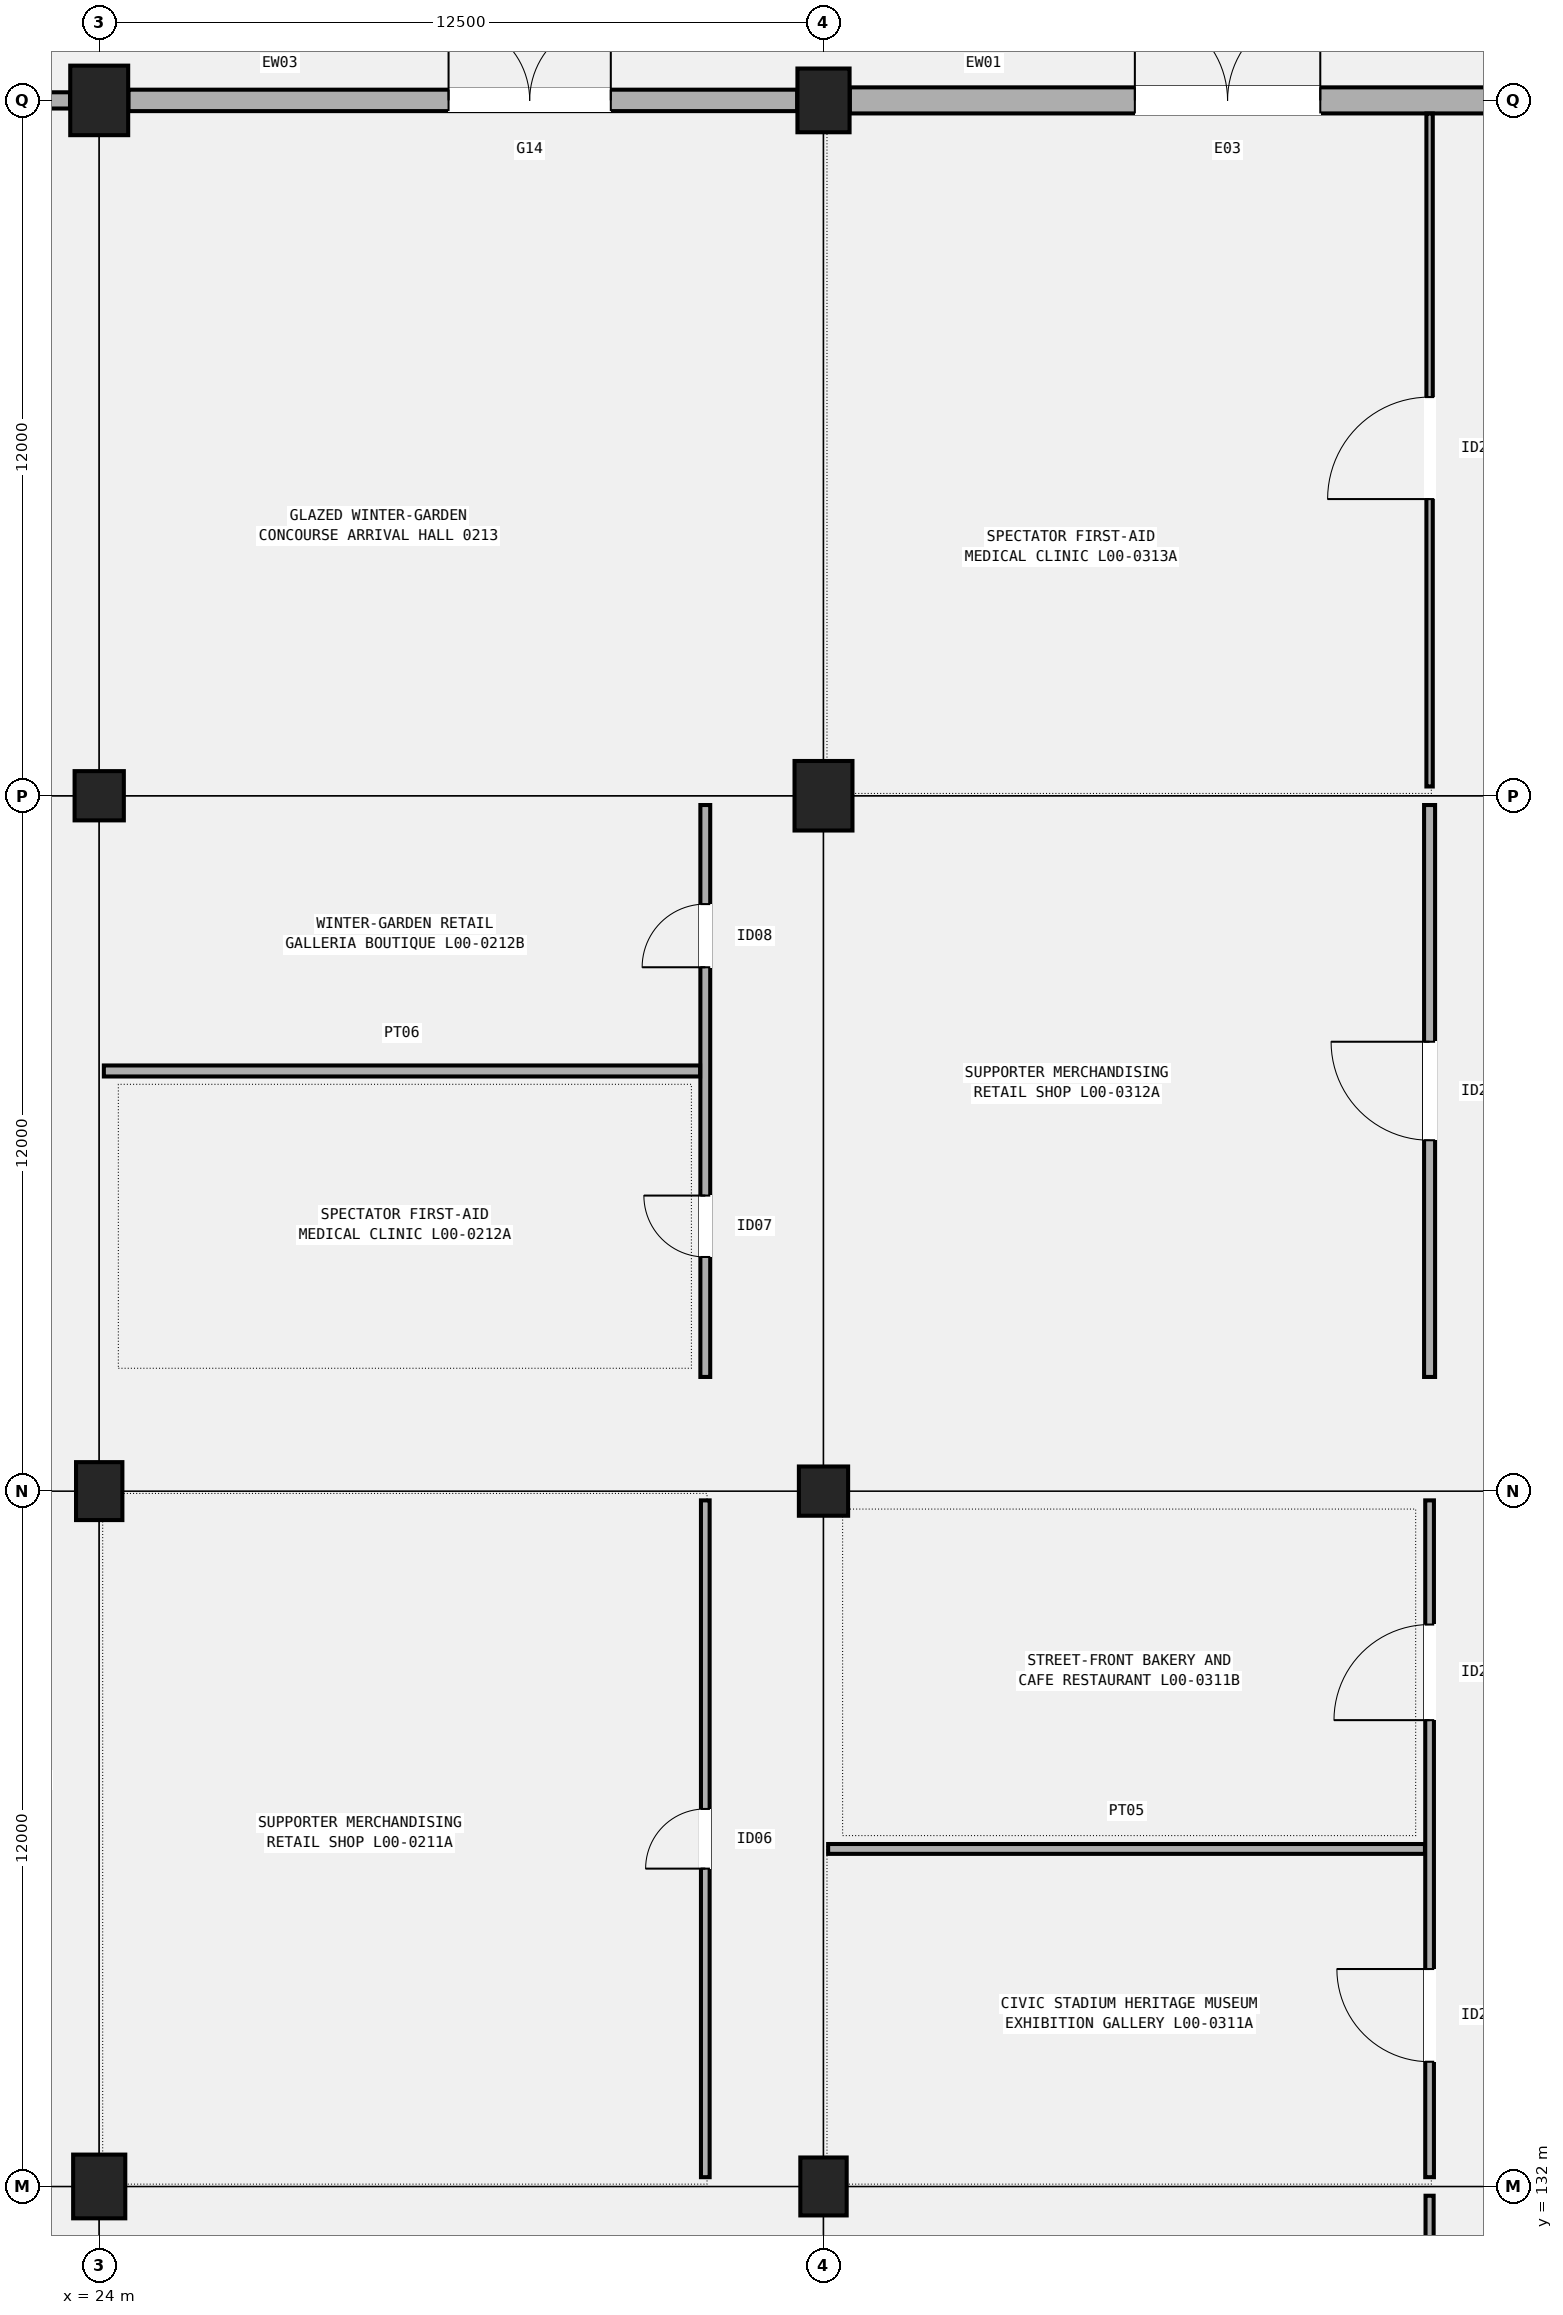
"""IFC4 building model, lengths in metres.
Left out: names, types, materials, properties, quantities, classifications, styles, units other than length and angle.
Written with IfcOpenShell. Run it as: python <this file> out.ifc"""

import sys

from ifc_helpers import new_model, si_unit, direction, frame, frame_2d, origin, origin_2d, place, context, subcontext, project, spatial, rectangle, circle, extrude, element, fill, save


model = new_model("IFC4")
c1 = context("Model", 3, precision=1e-05, world=origin(), true_north=direction((0.0, 1.0)))
c2 = subcontext(c1, "Body", "Model", "MODEL_VIEW")
j1 = project(units=[si_unit("LENGTHUNIT", "METRE"), si_unit("PLANEANGLEUNIT", "RADIAN")], contexts=[c1])
p1 = place(None, origin())
s1 = spatial("IfcSite", under=j1, at=p1, CompositionType="ELEMENT")
p2 = place(p1, origin())
s2 = spatial("IfcBuilding", under=s1, at=p2, CompositionType="ELEMENT")
p3 = place(p2, origin())
s3 = spatial("IfcBuildingStorey", under=s2, at=p3, CompositionType="ELEMENT", Elevation=0.0)
p4 = place(p3, frame((24.0, 132.0, 0.0), z_axis=(0.0, 0.0, 1.0), x_axis=(1.0, 0.0, 0.0)))
e1 = element("IfcColumn", 1, at=p4, inside=s3, PredefinedType="COLUMN", context=c2, shape_type="SweptSolid", body=[
    extrude(rectangle(XDim=0.9, YDim=1.1, at=origin_2d()), origin(), (0.0, 0.0, 1.0), 5.4),
])
p5 = place(p3, frame((24.0, 144.0, 0.0), z_axis=(0.0, 0.0, 1.0), x_axis=(1.0, 0.0, 0.0)))
e2 = element("IfcColumn", 2, at=p5, inside=s3, PredefinedType="COLUMN", context=c2, shape_type="SweptSolid", body=[
    extrude(rectangle(XDim=0.8, YDim=1.0, at=origin_2d()), origin(), (0.0, 0.0, 1.0), 5.4),
])
p6 = place(p3, frame((24.0, 156.0, 0.0), z_axis=(0.0, 0.0, 1.0), x_axis=(1.0, 0.0, 0.0)))
e3 = element("IfcColumn", 3, at=p6, inside=s3, PredefinedType="COLUMN", context=c2, shape_type="SweptSolid", body=[
    extrude(circle(Radius=0.425, at=origin_2d()), origin(), (0.0, 0.0, 1.0), 5.4),
])
p7 = place(p3, frame((24.0, 168.0, 0.0), z_axis=(0.0, 0.0, 1.0), x_axis=(1.0, 0.0, 0.0)))
e4 = element("IfcColumn", 4, at=p7, inside=s3, PredefinedType="COLUMN", context=c2, shape_type="SweptSolid", body=[
    extrude(rectangle(XDim=1.0, YDim=1.2, at=origin_2d()), origin(), (0.0, 0.0, 1.0), 5.4),
])
p8 = place(p3, frame((36.5, 132.0, 0.0), z_axis=(0.0, 0.0, 1.0), x_axis=(1.0, 0.0, 0.0)))
e5 = element("IfcColumn", 5, at=p8, inside=s3, PredefinedType="COLUMN", context=c2, shape_type="SweptSolid", body=[
    extrude(rectangle(XDim=0.8, YDim=1.0, at=origin_2d()), origin(), (0.0, 0.0, 1.0), 5.4),
])
p9 = place(p3, frame((36.5, 144.0, 0.0), z_axis=(0.0, 0.0, 1.0), x_axis=(1.0, 0.0, 0.0)))
e6 = element("IfcColumn", 6, at=p9, inside=s3, PredefinedType="COLUMN", context=c2, shape_type="SweptSolid", body=[
    extrude(circle(Radius=0.425, at=origin_2d()), origin(), (0.0, 0.0, 1.0), 5.4),
])
p10 = place(p3, frame((36.5, 156.0, 0.0), z_axis=(0.0, 0.0, 1.0), x_axis=(1.0, 0.0, 0.0)))
e7 = element("IfcColumn", 7, at=p10, inside=s3, PredefinedType="COLUMN", context=c2, shape_type="SweptSolid", body=[
    extrude(rectangle(XDim=1.0, YDim=1.2, at=origin_2d()), origin(), (0.0, 0.0, 1.0), 5.4),
])
p11 = place(p3, frame((36.5, 168.0, 0.0), z_axis=(0.0, 0.0, 1.0), x_axis=(1.0, 0.0, 0.0)))
e8 = element("IfcColumn", 8, at=p11, inside=s3, PredefinedType="COLUMN", context=c2, shape_type="SweptSolid", body=[
    extrude(rectangle(XDim=0.9, YDim=1.1, at=origin_2d()), origin(), (0.0, 0.0, 1.0), 5.4),
])
p12 = place(p3, frame((12.429, 168.0, 0.0), z_axis=(0.0, 0.0, 1.0), x_axis=(1.0, 0.0, 0.0)))
e9 = element("IfcWall", 9, at=p12, inside=s3, PredefinedType="SOLIDWALL", context=c2, shape_type="SweptSolid", body=[
    extrude(rectangle(XDim=11.067, YDim=0.28, at=frame_2d((5.534, 0.0))), origin(), (0.0, 0.0, 1.0), 4.34),
])
p13 = place(p12, frame((5.24, 0.0, 0.0)))
e10 = element("IfcOpeningElement", 10, at=p13, cuts=e9, PredefinedType="OPENING", context=c2, shape_type="SweptSolid", body=[
    extrude(rectangle(XDim=2.8, YDim=2.4, at=frame_2d((1.4, 1.2))), frame((0.0, 0.15, 0.0), z_axis=(0.0, -1.0, 0.0), x_axis=(1.0, 0.0, 0.0)), (0.0, 0.0, 1.0), 0.3),
])
p14 = place(p3, frame((24.504, 168.0, 0.0), z_axis=(0.0, 0.0, 1.0), x_axis=(1.0, 0.0, 0.0)))
e11 = element("IfcWall", 11, at=p14, inside=s3, PredefinedType="SOLIDWALL", context=c2, shape_type="SweptSolid", body=[
    extrude(rectangle(XDim=11.542, YDim=0.37, at=frame_2d((5.771, 0.0))), origin(), (0.0, 0.0, 1.0), 4.09),
])
p15 = place(p14, frame((5.525, 0.0, 0.0)))
e12 = element("IfcOpeningElement", 12, at=p15, cuts=e11, PredefinedType="OPENING", context=c2, shape_type="SweptSolid", body=[
    extrude(rectangle(XDim=2.8, YDim=2.4, at=frame_2d((1.4, 1.2))), frame((0.0, 0.195, 0.0), z_axis=(0.0, -1.0, 0.0), x_axis=(1.0, 0.0, 0.0)), (0.0, 0.0, 1.0), 0.39),
])
p16 = place(p3, frame((36.954, 168.0, 0.0), z_axis=(0.0, 0.0, 1.0), x_axis=(1.0, 0.0, 0.0)))
e13 = element("IfcWall", 13, at=p16, inside=s3, PredefinedType="SOLIDWALL", context=c2, shape_type="SweptSolid", body=[
    extrude(rectangle(XDim=11.642, YDim=0.45, at=frame_2d((5.821, 0.0))), origin(), (0.0, 0.0, 1.0), 4.24),
])
p17 = place(p16, frame((4.919, 0.0, 0.0)))
e14 = element("IfcOpeningElement", 14, at=p17, cuts=e13, PredefinedType="OPENING", context=c2, shape_type="SweptSolid", body=[
    extrude(rectangle(XDim=3.2, YDim=2.6, at=frame_2d((1.6, 1.3))), frame((0.0, 0.235, 0.0), z_axis=(0.0, -1.0, 0.0), x_axis=(1.0, 0.0, 0.0)), (0.0, 0.0, 1.0), 0.47),
])
p18 = place(p3, frame((34.46, 132.16, 0.0), z_axis=(0.0, 0.0, 1.0), x_axis=(0.0, 1.0, 0.0)))
e15 = element("IfcWall", 15, at=p18, inside=s3, PredefinedType="PARTITIONING", context=c2, shape_type="SweptSolid", body=[
    extrude(rectangle(XDim=11.68, YDim=0.15, at=frame_2d((5.84, 0.0))), origin(), (0.0, 0.0, 1.0), 4.52),
])
p19 = place(p18, frame((5.325, 0.0, 0.0)))
e16 = element("IfcOpeningElement", 16, at=p19, cuts=e15, PredefinedType="OPENING", context=c2, shape_type="SweptSolid", body=[
    extrude(rectangle(XDim=1.03, YDim=2.12, at=frame_2d((0.515, 1.06))), frame((0.0, 0.085, 0.0), z_axis=(0.0, -1.0, 0.0), x_axis=(1.0, 0.0, 0.0)), (0.0, 0.0, 1.0), 0.17),
])
p20 = place(p3, frame((34.46, 145.97, 0.0), z_axis=(0.0, 0.0, 1.0), x_axis=(0.0, 1.0, 0.0)))
e17 = element("IfcWall", 17, at=p20, inside=s3, PredefinedType="PARTITIONING", context=c2, shape_type="SweptSolid", body=[
    extrude(rectangle(XDim=9.87, YDim=0.17, at=frame_2d((4.935, 0.0))), origin(), (0.0, 0.0, 1.0), 4.52),
])
p21 = place(p20, frame((2.07, 0.0, 0.0)))
e18 = element("IfcOpeningElement", 18, at=p21, cuts=e17, PredefinedType="OPENING", context=c2, shape_type="SweptSolid", body=[
    extrude(rectangle(XDim=1.06, YDim=2.15, at=frame_2d((0.53, 1.075))), frame((0.0, 0.095, 0.0), z_axis=(0.0, -1.0, 0.0), x_axis=(1.0, 0.0, 0.0)), (0.0, 0.0, 1.0), 0.19),
])
p22 = place(p20, frame((7.07, 0.0, 0.0)))
e19 = element("IfcOpeningElement", 19, at=p22, cuts=e17, PredefinedType="OPENING", context=c2, shape_type="SweptSolid", body=[
    extrude(rectangle(XDim=1.09, YDim=2.16, at=frame_2d((0.545, 1.08))), frame((0.0, 0.095, 0.0), z_axis=(0.0, -1.0, 0.0), x_axis=(1.0, 0.0, 0.0)), (0.0, 0.0, 1.0), 0.19),
])
p23 = place(p3, frame((24.08, 151.25, 0.0), z_axis=(0.0, 0.0, 1.0), x_axis=(1.0, 0.0, 0.0)))
e20 = element("IfcWall", 20, at=p23, inside=s3, PredefinedType="PARTITIONING", context=c2, shape_type="SweptSolid", body=[
    extrude(rectangle(XDim=10.29, YDim=0.19, at=frame_2d((5.145, 0.0))), origin(), (0.0, 0.0, 1.0), 4.52),
])
p24 = place(p3, frame((46.96, 120.16, 0.0), z_axis=(0.0, 0.0, 1.0), x_axis=(0.0, 1.0, 0.0)))
e21 = element("IfcWall", 21, at=p24, inside=s3, PredefinedType="PARTITIONING", context=c2, shape_type="SweptSolid", body=[
    extrude(rectangle(XDim=11.68, YDim=0.14, at=frame_2d((5.84, 0.0))), origin(), (0.0, 0.0, 1.0), 4.52),
])
p25 = place(p24, frame((5.06, 0.0, 0.0)))
e22 = element("IfcOpeningElement", 22, at=p25, cuts=e21, PredefinedType="OPENING", context=c2, shape_type="SweptSolid", body=[
    extrude(rectangle(XDim=1.56, YDim=2.26, at=frame_2d((0.78, 1.13))), frame((0.0, 0.08, 0.0), z_axis=(0.0, -1.0, 0.0), x_axis=(1.0, 0.0, 0.0)), (0.0, 0.0, 1.0), 0.16),
])
p26 = place(p3, frame((46.96, 132.16, 0.0), z_axis=(0.0, 0.0, 1.0), x_axis=(0.0, 1.0, 0.0)))
e23 = element("IfcWall", 23, at=p26, inside=s3, PredefinedType="PARTITIONING", context=c2, shape_type="SweptSolid", body=[
    extrude(rectangle(XDim=11.68, YDim=0.15, at=frame_2d((5.84, 0.0))), origin(), (0.0, 0.0, 1.0), 4.52),
])
p27 = place(p26, frame((1.992, 0.0, 0.0)))
e24 = element("IfcOpeningElement", 24, at=p27, cuts=e23, PredefinedType="OPENING", context=c2, shape_type="SweptSolid", body=[
    extrude(rectangle(XDim=1.6, YDim=2.3, at=frame_2d((0.8, 1.15))), frame((0.0, 0.085, 0.0), z_axis=(0.0, -1.0, 0.0), x_axis=(1.0, 0.0, 0.0)), (0.0, 0.0, 1.0), 0.17),
])
p28 = place(p26, frame((7.887, 0.0, 0.0)))
e25 = element("IfcOpeningElement", 25, at=p28, cuts=e23, PredefinedType="OPENING", context=c2, shape_type="SweptSolid", body=[
    extrude(rectangle(XDim=1.65, YDim=2.28, at=frame_2d((0.825, 1.14))), frame((0.0, 0.085, 0.0), z_axis=(0.0, -1.0, 0.0), x_axis=(1.0, 0.0, 0.0)), (0.0, 0.0, 1.0), 0.17),
])
p29 = place(p3, frame((36.58, 137.825, 0.0), z_axis=(0.0, 0.0, 1.0), x_axis=(1.0, 0.0, 0.0)))
e26 = element("IfcWall", 26, at=p29, inside=s3, PredefinedType="PARTITIONING", context=c2, shape_type="SweptSolid", body=[
    extrude(rectangle(XDim=10.3, YDim=0.17, at=frame_2d((5.15, 0.0))), origin(), (0.0, 0.0, 1.0), 4.52),
])
p30 = place(p3, frame((46.96, 145.97, 0.0), z_axis=(0.0, 0.0, 1.0), x_axis=(0.0, 1.0, 0.0)))
e27 = element("IfcWall", 27, at=p30, inside=s3, PredefinedType="PARTITIONING", context=c2, shape_type="SweptSolid", body=[
    extrude(rectangle(XDim=9.87, YDim=0.19, at=frame_2d((4.935, 0.0))), origin(), (0.0, 0.0, 1.0), 4.52),
])
p31 = place(p30, frame((4.085, 0.0, 0.0)))
e28 = element("IfcOpeningElement", 28, at=p31, cuts=e27, PredefinedType="OPENING", context=c2, shape_type="SweptSolid", body=[
    extrude(rectangle(XDim=1.7, YDim=2.32, at=frame_2d((0.85, 1.16))), frame((0.0, 0.105, 0.0), z_axis=(0.0, -1.0, 0.0), x_axis=(1.0, 0.0, 0.0)), (0.0, 0.0, 1.0), 0.21),
])
p32 = place(p3, frame((46.96, 156.16, 0.0), z_axis=(0.0, 0.0, 1.0), x_axis=(0.0, 1.0, 0.0)))
e29 = element("IfcWall", 29, at=p32, inside=s3, PredefinedType="PARTITIONING", context=c2, shape_type="SweptSolid", body=[
    extrude(rectangle(XDim=11.613, YDim=0.11, at=frame_2d((5.807, 0.0))), origin(), (0.0, 0.0, 1.0), 4.52),
])
p33 = place(p32, frame((4.96, 0.0, 0.0)))
e30 = element("IfcOpeningElement", 30, at=p33, cuts=e29, PredefinedType="OPENING", context=c2, shape_type="SweptSolid", body=[
    extrude(rectangle(XDim=1.76, YDim=2.3, at=frame_2d((0.88, 1.15))), frame((0.0, 0.065, 0.0), z_axis=(0.0, -1.0, 0.0), x_axis=(1.0, 0.0, 0.0)), (0.0, 0.0, 1.0), 0.13),
])
p34 = place(p15, origin())
e31 = element("IfcDoor", 31, at=p34, inside=s3, OperationType="DOUBLE_DOOR_SINGLE_SWING", PredefinedType="DOOR", context=c2, shape_type="SweptSolid", body=[
    extrude(rectangle(XDim=2.8, YDim=2.4, at=frame_2d((1.4, 1.2))), frame((0.0, 0.025, 0.0), z_axis=(0.0, -1.0, 0.0), x_axis=(1.0, 0.0, 0.0)), (0.0, 0.0, 1.0), 0.05),
])
fill(e12, e31)
p35 = place(p17, origin())
e32 = element("IfcDoor", 32, at=p35, inside=s3, OperationType="DOUBLE_DOOR_SINGLE_SWING", PredefinedType="DOOR", context=c2, shape_type="SweptSolid", body=[
    extrude(rectangle(XDim=3.2, YDim=2.6, at=frame_2d((1.6, 1.3))), frame((0.0, 0.025, 0.0), z_axis=(0.0, -1.0, 0.0), x_axis=(1.0, 0.0, 0.0)), (0.0, 0.0, 1.0), 0.05),
])
fill(e14, e32)
p36 = place(p19, origin())
e33 = element("IfcDoor", 33, at=p36, inside=s3, OperationType="SINGLE_SWING_LEFT", PredefinedType="DOOR", context=c2, shape_type="SweptSolid", body=[
    extrude(rectangle(XDim=1.03, YDim=2.12, at=frame_2d((0.515, 1.06))), frame((0.0, 0.025, 0.0), z_axis=(0.0, -1.0, 0.0), x_axis=(1.0, 0.0, 0.0)), (0.0, 0.0, 1.0), 0.05),
])
fill(e16, e33)
p37 = place(p21, origin())
e34 = element("IfcDoor", 34, at=p37, inside=s3, OperationType="SINGLE_SWING_RIGHT", PredefinedType="DOOR", context=c2, shape_type="SweptSolid", body=[
    extrude(rectangle(XDim=1.06, YDim=2.15, at=frame_2d((0.53, 1.075))), frame((0.0, 0.025, 0.0), z_axis=(0.0, -1.0, 0.0), x_axis=(1.0, 0.0, 0.0)), (0.0, 0.0, 1.0), 0.05),
])
fill(e18, e34)
p38 = place(p22, origin())
e35 = element("IfcDoor", 35, at=p38, inside=s3, OperationType="SINGLE_SWING_LEFT", PredefinedType="DOOR", context=c2, shape_type="SweptSolid", body=[
    extrude(rectangle(XDim=1.09, YDim=2.16, at=frame_2d((0.545, 1.08))), frame((0.0, 0.025, 0.0), z_axis=(0.0, -1.0, 0.0), x_axis=(1.0, 0.0, 0.0)), (0.0, 0.0, 1.0), 0.05),
])
fill(e19, e35)
p39 = place(p27, origin())
e36 = element("IfcDoor", 36, at=p39, inside=s3, OperationType="SINGLE_SWING_RIGHT", PredefinedType="DOOR", context=c2, shape_type="SweptSolid", body=[
    extrude(rectangle(XDim=1.6, YDim=2.3, at=frame_2d((0.8, 1.15))), frame((0.0, 0.025, 0.0), z_axis=(0.0, -1.0, 0.0), x_axis=(1.0, 0.0, 0.0)), (0.0, 0.0, 1.0), 0.05),
])
fill(e24, e36)
p40 = place(p28, origin())
e37 = element("IfcDoor", 37, at=p40, inside=s3, OperationType="SINGLE_SWING_LEFT", PredefinedType="DOOR", context=c2, shape_type="SweptSolid", body=[
    extrude(rectangle(XDim=1.65, YDim=2.28, at=frame_2d((0.825, 1.14))), frame((0.0, 0.025, 0.0), z_axis=(0.0, -1.0, 0.0), x_axis=(1.0, 0.0, 0.0)), (0.0, 0.0, 1.0), 0.05),
])
fill(e25, e37)
p41 = place(p31, origin())
e38 = element("IfcDoor", 38, at=p41, inside=s3, OperationType="SINGLE_SWING_RIGHT", PredefinedType="DOOR", context=c2, shape_type="SweptSolid", body=[
    extrude(rectangle(XDim=1.7, YDim=2.32, at=frame_2d((0.85, 1.16))), frame((0.0, 0.025, 0.0), z_axis=(0.0, -1.0, 0.0), x_axis=(1.0, 0.0, 0.0)), (0.0, 0.0, 1.0), 0.05),
])
fill(e28, e38)
p42 = place(p33, origin())
e39 = element("IfcDoor", 39, at=p42, inside=s3, OperationType="SINGLE_SWING_LEFT", PredefinedType="DOOR", context=c2, shape_type="SweptSolid", body=[
    extrude(rectangle(XDim=1.76, YDim=2.3, at=frame_2d((0.88, 1.15))), frame((0.0, 0.025, 0.0), z_axis=(0.0, -1.0, 0.0), x_axis=(1.0, 0.0, 0.0)), (0.0, 0.0, 1.0), 0.05),
])
fill(e30, e39)
save(model, sys.argv[1])
